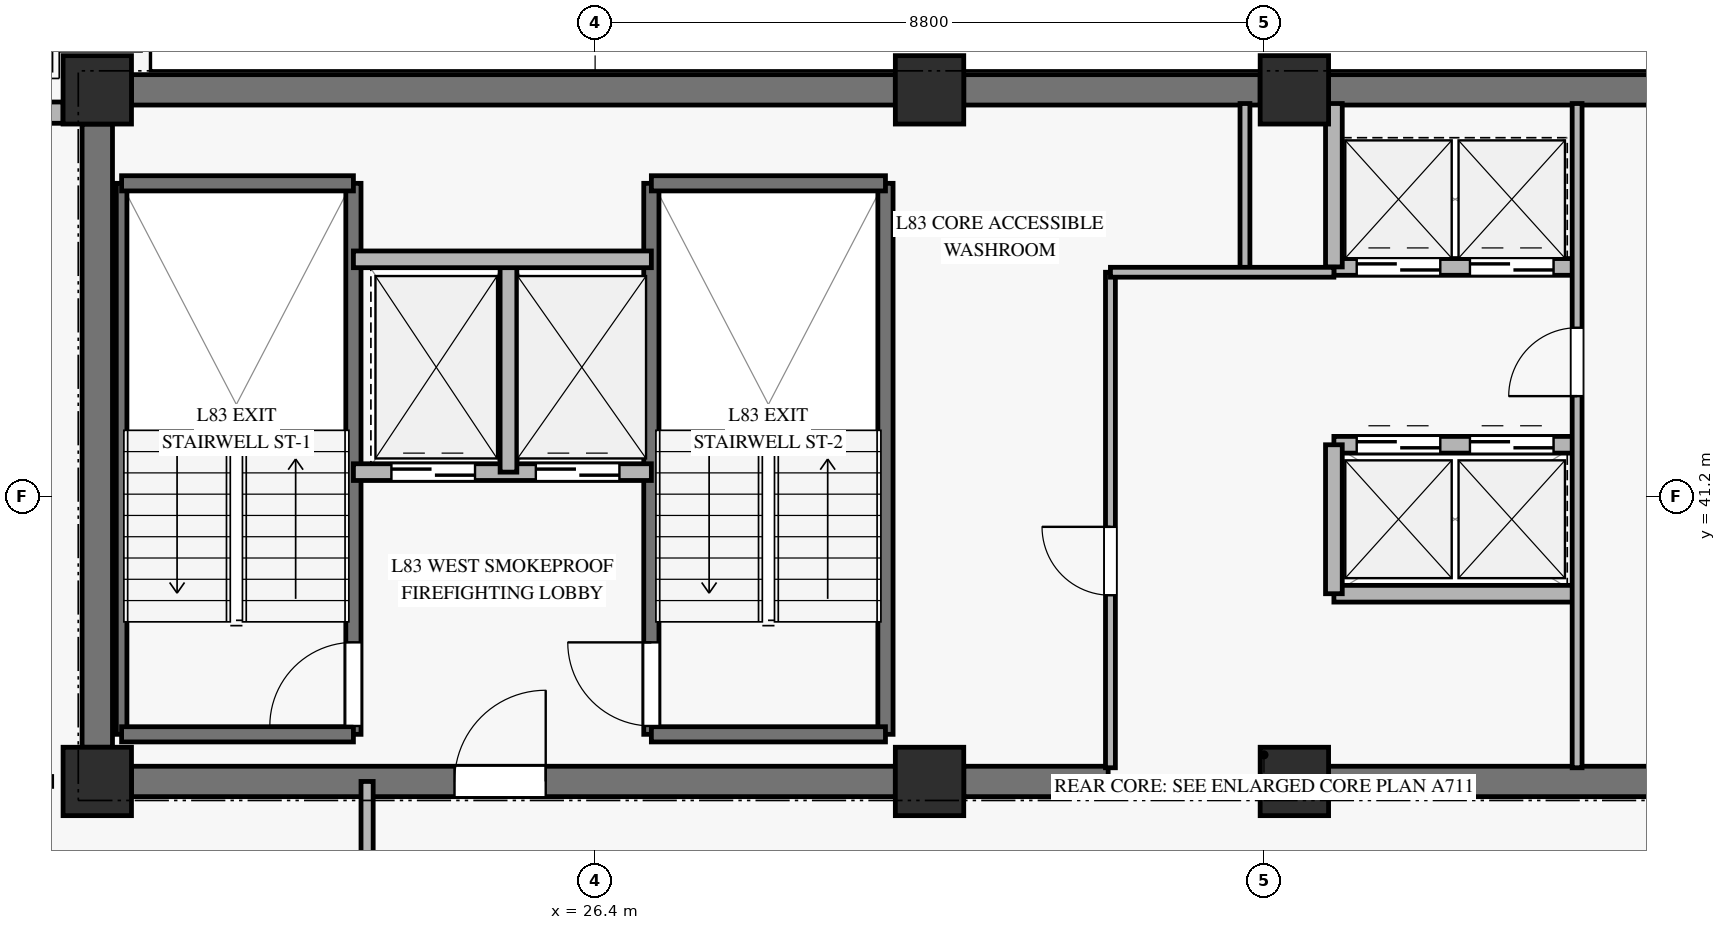
"""IFC4 building model, lengths in metres.
Left out: names, types, materials, properties, quantities, classifications, styles, units other than length and angle.
Written with IfcOpenShell. Run it as: python <this file> out.ifc"""

import sys

from ifc_helpers import new_model, si_unit, direction, frame, frame_2d, origin, origin_2d, place, context, subcontext, project, spatial, rectangle, extrude, source, transform, mapped, element, fill, save


model = new_model("IFC4")
c1 = context("Model", 3, precision=1e-05, world=origin(), true_north=direction((0.0, 1.0)))
c2 = subcontext(c1, "Body", "Model", "MODEL_VIEW")
j1 = project(units=[si_unit("LENGTHUNIT", "METRE"), si_unit("PLANEANGLEUNIT", "RADIAN")], contexts=[c1])
p1 = place(None, origin())
s1 = spatial("IfcSite", under=j1, at=p1, CompositionType="ELEMENT")
p2 = place(p1, origin())
s2 = spatial("IfcBuilding", under=s1, at=p2, CompositionType="ELEMENT")
p3 = place(p2, frame((0.0, 0.0, 321.0)))
s3 = spatial("IfcBuildingStorey", under=s2, at=p3, CompositionType="ELEMENT", Elevation=321.0)
m1 = source(origin(), c2, "Body", "SweptSolid", [
    extrude(rectangle(XDim=0.9, YDim=0.9, at=origin_2d()), origin(), (0.0, 0.0, 1.0), 3.185),
])
for number, where, z_axis, x_axis in (
    (1, (19.85, 37.45, 0.0), (0.0, 0.0, 1.0), (1.0, 0.0, 0.0)),
    (2, (19.85, 46.55, 0.0), (0.0, 0.0, 1.0), (1.0, 0.0, 0.0)),
    (3, (30.8, 37.45, 0.0), (0.0, 0.0, 1.0), (1.0, 0.0, 0.0)),
    (4, (30.8, 46.55, 0.0), (0.0, 0.0, 1.0), (1.0, 0.0, 0.0)),
    (5, (35.6, 37.45, 0.0), (0.0, 0.0, 1.0), (1.0, 0.0, 0.0)),
    (6, (35.6, 46.55, 0.0), (0.0, 0.0, 1.0), (1.0, 0.0, 0.0)),
):
    element("IfcColumn", number, at=place(p3, frame(where, z_axis=z_axis, x_axis=x_axis)), inside=s3, PredefinedType="PILASTER", context=c2, shape_type="MappedRepresentation", body=[
        mapped(m1, transform((0.0, 0.0, 0.0), x_axis=(1.0, 0.0, 0.0), y_axis=(0.0, 1.0, 0.0), z_axis=(0.0, 0.0, 1.0), scale=1.0)),
    ])
p4 = place(p3, frame((20.3, 46.55, 0.0), z_axis=(0.0, 0.0, 1.0), x_axis=(1.0, 0.0, 0.0)))
e7 = element("IfcWall", 7, at=p4, inside=s3, PredefinedType="SHEAR", context=c2, shape_type="SweptSolid", body=[
    extrude(rectangle(XDim=10.05, YDim=0.4, at=frame_2d((5.025, 0.0))), origin(), (0.0, 0.0, 1.0), 3.185),
])
p5 = place(p3, frame((31.25, 46.55, 0.0), z_axis=(0.0, 0.0, 1.0), x_axis=(1.0, 0.0, 0.0)))
e8 = element("IfcWall", 8, at=p5, inside=s3, PredefinedType="SHEAR", context=c2, shape_type="SweptSolid", body=[
    extrude(rectangle(XDim=3.9, YDim=0.4, at=frame_2d((1.95, 0.0))), origin(), (0.0, 0.0, 1.0), 3.185),
])
p6 = place(p3, frame((36.05, 46.55, 0.0), z_axis=(0.0, 0.0, 1.0), x_axis=(1.0, 0.0, 0.0)))
e9 = element("IfcWall", 9, at=p6, inside=s3, PredefinedType="SHEAR", context=c2, shape_type="SweptSolid", body=[
    extrude(rectangle(XDim=7.8, YDim=0.4, at=frame_2d((3.9, 0.0))), origin(), (0.0, 0.0, 1.0), 3.185),
])
p7 = place(p3, frame((20.3, 37.45, 0.0), z_axis=(0.0, 0.0, 1.0), x_axis=(1.0, 0.0, 0.0)))
e10 = element("IfcWall", 10, at=p7, inside=s3, PredefinedType="SHEAR", context=c2, shape_type="SweptSolid", body=[
    extrude(rectangle(XDim=10.05, YDim=0.4, at=frame_2d((5.025, 0.0))), origin(), (0.0, 0.0, 1.0), 3.185),
])
p8 = place(p7, frame((4.25, 0.0, 0.0)))
e11 = element("IfcOpeningElement", 11, at=p8, cuts=e10, PredefinedType="OPENING", context=c2, shape_type="SweptSolid", body=[
    extrude(rectangle(XDim=1.2, YDim=2.15, at=frame_2d((0.6, 1.075))), frame((0.0, 0.21, 0.0), z_axis=(0.0, -1.0, 0.0), x_axis=(1.0, 0.0, 0.0)), (0.0, 0.0, 1.0), 0.42),
])
p9 = place(p3, frame((31.25, 37.45, 0.0), z_axis=(0.0, 0.0, 1.0), x_axis=(1.0, 0.0, 0.0)))
e12 = element("IfcWall", 12, at=p9, inside=s3, PredefinedType="SHEAR", context=c2, shape_type="SweptSolid", body=[
    extrude(rectangle(XDim=1.9, YDim=0.4, at=frame_2d((0.95, 0.0))), origin(), (0.0, 0.0, 1.0), 3.185),
])
p10 = place(p3, frame((36.05, 37.45, 0.0), z_axis=(0.0, 0.0, 1.0), x_axis=(1.0, 0.0, 0.0)))
e13 = element("IfcWall", 13, at=p10, inside=s3, PredefinedType="SHEAR", context=c2, shape_type="SweptSolid", body=[
    extrude(rectangle(XDim=7.8, YDim=0.4, at=frame_2d((3.9, 0.0))), origin(), (0.0, 0.0, 1.0), 3.185),
])
p11 = place(p3, frame((19.85, 37.9, 0.0), z_axis=(0.0, 0.0, 1.0), x_axis=(0.0, 1.0, 0.0)))
e14 = element("IfcWall", 14, at=p11, inside=s3, PredefinedType="SHEAR", context=c2, shape_type="SweptSolid", body=[
    extrude(rectangle(XDim=8.2, YDim=0.4, at=frame_2d((4.1, 0.0))), origin(), (0.0, 0.0, 1.0), 3.185),
])
p12 = place(p3, frame((13.393, 46.25, 0.0), z_axis=(0.0, 0.0, 1.0), x_axis=(1.0, 0.0, 0.0)))
e15 = element("IfcWall", 15, at=p12, inside=s3, PredefinedType="SOLIDWALL", context=c2, shape_type="SweptSolid", body=[
    extrude(rectangle(XDim=6.007, YDim=0.28, at=frame_2d((3.003, 0.0))), origin(), (0.0, 0.0, 1.0), 2.815),
])
p13 = place(p12, frame((2.203, 0.0, 0.45)))
e16 = element("IfcOpeningElement", 16, at=p13, cuts=e15, PredefinedType="OPENING", context=c2, shape_type="SweptSolid", body=[
    extrude(rectangle(XDim=1.6, YDim=2.0, at=frame_2d((0.8, 1.0))), frame((0.0, 0.15, 0.0), z_axis=(0.0, -1.0, 0.0), x_axis=(1.0, 0.0, 0.0)), (0.0, 0.0, 1.0), 0.3),
])
p14 = place(p3, frame((20.17, 38.07, 0.0), z_axis=(0.0, 0.0, 1.0), x_axis=(0.0, 1.0, 0.0)))
e17 = element("IfcWall", 17, at=p14, inside=s3, PredefinedType="SOLIDWALL", context=c2, shape_type="SweptSolid", body=[
    extrude(rectangle(XDim=7.25, YDim=0.14, at=frame_2d((3.625, 0.0))), origin(), (0.0, 0.0, 1.0), 3.4),
])
p15 = place(p3, frame((23.22, 38.07, 0.0), z_axis=(0.0, 0.0, 1.0), x_axis=(0.0, 1.0, 0.0)))
e18 = element("IfcWall", 18, at=p15, inside=s3, PredefinedType="SOLIDWALL", context=c2, shape_type="SweptSolid", body=[
    extrude(rectangle(XDim=7.25, YDim=0.2, at=frame_2d((3.625, 0.0))), origin(), (0.0, 0.0, 1.0), 3.4),
])
p16 = place(p15, frame((0.11, 0.0, 0.0)))
e19 = element("IfcOpeningElement", 19, at=p16, cuts=e18, PredefinedType="OPENING", context=c2, shape_type="SweptSolid", body=[
    extrude(rectangle(XDim=1.1, YDim=2.15, at=frame_2d((0.55, 1.075))), frame((0.0, 0.11, 0.0), z_axis=(0.0, -1.0, 0.0), x_axis=(1.0, 0.0, 0.0)), (0.0, 0.0, 1.0), 0.22),
])
for number, where, z_axis, x_axis in (
    (20, (20.17, 45.32, 0.0), (0.0, 0.0, 1.0), (1.0, 0.0, 0.0)),
    (21, (20.17, 38.07, 0.0), (0.0, 0.0, 1.0), (1.0, 0.0, 0.0)),
):
    element("IfcWall", number, at=place(p3, frame(where, z_axis=z_axis, x_axis=x_axis)), inside=s3, PredefinedType="SOLIDWALL", context=c2, shape_type="SweptSolid", body=[
        extrude(rectangle(XDim=3.05, YDim=0.2, at=frame_2d((1.525, 0.0))), origin(), (0.0, 0.0, 1.0), 3.4),
    ])
p17 = place(p3, frame((27.14, 38.07, 0.0), z_axis=(0.0, 0.0, 1.0), x_axis=(0.0, 1.0, 0.0)))
e22 = element("IfcWall", 22, at=p17, inside=s3, PredefinedType="SOLIDWALL", context=c2, shape_type="SweptSolid", body=[
    extrude(rectangle(XDim=7.25, YDim=0.2, at=frame_2d((3.625, 0.0))), origin(), (0.0, 0.0, 1.0), 3.4),
])
p18 = place(p17, frame((0.11, 0.0, 0.0)))
e23 = element("IfcOpeningElement", 23, at=p18, cuts=e22, PredefinedType="OPENING", context=c2, shape_type="SweptSolid", body=[
    extrude(rectangle(XDim=1.1, YDim=2.15, at=frame_2d((0.55, 1.075))), frame((0.0, 0.11, 0.0), z_axis=(0.0, -1.0, 0.0), x_axis=(1.0, 0.0, 0.0)), (0.0, 0.0, 1.0), 0.22),
])
p19 = place(p3, frame((30.22, 38.07, 0.0), z_axis=(0.0, 0.0, 1.0), x_axis=(0.0, 1.0, 0.0)))
e24 = element("IfcWall", 24, at=p19, inside=s3, PredefinedType="SOLIDWALL", context=c2, shape_type="SweptSolid", body=[
    extrude(rectangle(XDim=7.25, YDim=0.2, at=frame_2d((3.625, 0.0))), origin(), (0.0, 0.0, 1.0), 3.4),
])
for number, where, z_axis, x_axis in (
    (25, (27.14, 45.32, 0.0), (0.0, 0.0, 1.0), (1.0, 0.0, 0.0)),
    (26, (27.14, 38.07, 0.0), (0.0, 0.0, 1.0), (1.0, 0.0, 0.0)),
):
    element("IfcWall", number, at=place(p3, frame(where, z_axis=z_axis, x_axis=x_axis)), inside=s3, PredefinedType="SOLIDWALL", context=c2, shape_type="SweptSolid", body=[
        extrude(rectangle(XDim=3.08, YDim=0.2, at=frame_2d((1.54, 0.0))), origin(), (0.0, 0.0, 1.0), 3.4),
    ])
p20 = place(p3, frame((23.22, 41.52, 0.0), z_axis=(0.0, 0.0, 1.0), x_axis=(1.0, 0.0, 0.0)))
e27 = element("IfcWall", 27, at=p20, inside=s3, PredefinedType="SOLIDWALL", context=c2, shape_type="SweptSolid", body=[
    extrude(rectangle(XDim=3.92, YDim=0.22, at=frame_2d((1.96, 0.0))), origin(), (0.0, 0.0, 1.0), 3.185),
])
p21 = place(p20, frame((0.5, 0.0, 0.0)))
e28 = element("IfcOpeningElement", 28, at=p21, cuts=e27, PredefinedType="OPENING", context=c2, shape_type="SweptSolid", body=[
    extrude(rectangle(XDim=1.1, YDim=2.2, at=frame_2d((0.55, 1.1))), frame((0.0, 0.12, 0.0), z_axis=(0.0, -1.0, 0.0), x_axis=(1.0, 0.0, 0.0)), (0.0, 0.0, 1.0), 0.24),
])
p22 = place(p20, frame((2.4, 0.0, 0.0)))
e29 = element("IfcOpeningElement", 29, at=p22, cuts=e27, PredefinedType="OPENING", context=c2, shape_type="SweptSolid", body=[
    extrude(rectangle(XDim=1.1, YDim=2.2, at=frame_2d((0.55, 1.1))), frame((0.0, 0.12, 0.0), z_axis=(0.0, -1.0, 0.0), x_axis=(1.0, 0.0, 0.0)), (0.0, 0.0, 1.0), 0.24),
])
p23 = place(p3, frame((25.26, 41.52, 0.0), z_axis=(0.0, 0.0, 1.0), x_axis=(0.0, 1.0, 0.0)))
e30 = element("IfcWall", 30, at=p23, inside=s3, PredefinedType="SOLIDWALL", context=c2, shape_type="SweptSolid", body=[
    extrude(rectangle(XDim=2.8, YDim=0.22, at=frame_2d((1.4, 0.0))), origin(), (0.0, 0.0, 1.0), 3.185),
])
p24 = place(p3, frame((23.22, 44.32, 0.0), z_axis=(0.0, 0.0, 1.0), x_axis=(1.0, 0.0, 0.0)))
e31 = element("IfcWall", 31, at=p24, inside=s3, PredefinedType="SOLIDWALL", context=c2, shape_type="SweptSolid", body=[
    extrude(rectangle(XDim=3.92, YDim=0.22, at=frame_2d((1.96, 0.0))), origin(), (0.0, 0.0, 1.0), 3.185),
])
p25 = place(p3, frame((36.12, 44.22, 0.0), z_axis=(0.0, 0.0, 1.0), x_axis=(1.0, 0.0, 0.0)))
e32 = element("IfcWall", 32, at=p25, inside=s3, PredefinedType="SOLIDWALL", context=c2, shape_type="SweptSolid", body=[
    extrude(rectangle(XDim=3.2, YDim=0.22, at=frame_2d((1.6, 0.0))), origin(), (0.0, 0.0, 1.0), 3.185),
])
p26 = place(p25, frame((0.3, 0.0, 0.0)))
e33 = element("IfcOpeningElement", 33, at=p26, cuts=e32, PredefinedType="OPENING", context=c2, shape_type="SweptSolid", body=[
    extrude(rectangle(XDim=1.1, YDim=2.2, at=frame_2d((0.55, 1.1))), frame((0.0, 0.12, 0.0), z_axis=(0.0, -1.0, 0.0), x_axis=(1.0, 0.0, 0.0)), (0.0, 0.0, 1.0), 0.24),
])
p27 = place(p25, frame((1.79, 0.0, 0.0)))
e34 = element("IfcOpeningElement", 34, at=p27, cuts=e32, PredefinedType="OPENING", context=c2, shape_type="SweptSolid", body=[
    extrude(rectangle(XDim=1.1, YDim=2.2, at=frame_2d((0.55, 1.1))), frame((0.0, 0.12, 0.0), z_axis=(0.0, -1.0, 0.0), x_axis=(1.0, 0.0, 0.0)), (0.0, 0.0, 1.0), 0.24),
])
p28 = place(p3, frame((36.12, 41.88, 0.0), z_axis=(0.0, 0.0, 1.0), x_axis=(1.0, 0.0, 0.0)))
e35 = element("IfcWall", 35, at=p28, inside=s3, PredefinedType="SOLIDWALL", context=c2, shape_type="SweptSolid", body=[
    extrude(rectangle(XDim=3.2, YDim=0.22, at=frame_2d((1.6, 0.0))), origin(), (0.0, 0.0, 1.0), 3.185),
])
p29 = place(p28, frame((0.3, 0.0, 0.0)))
e36 = element("IfcOpeningElement", 36, at=p29, cuts=e35, PredefinedType="OPENING", context=c2, shape_type="SweptSolid", body=[
    extrude(rectangle(XDim=1.1, YDim=2.2, at=frame_2d((0.55, 1.1))), frame((0.0, 0.12, 0.0), z_axis=(0.0, -1.0, 0.0), x_axis=(1.0, 0.0, 0.0)), (0.0, 0.0, 1.0), 0.24),
])
p30 = place(p28, frame((1.79, 0.0, 0.0)))
e37 = element("IfcOpeningElement", 37, at=p30, cuts=e35, PredefinedType="OPENING", context=c2, shape_type="SweptSolid", body=[
    extrude(rectangle(XDim=1.1, YDim=2.2, at=frame_2d((0.55, 1.1))), frame((0.0, 0.12, 0.0), z_axis=(0.0, -1.0, 0.0), x_axis=(1.0, 0.0, 0.0)), (0.0, 0.0, 1.0), 0.24),
])
p31 = place(p3, frame((36.12, 39.92, 0.0), z_axis=(0.0, 0.0, 1.0), x_axis=(1.0, 0.0, 0.0)))
e38 = element("IfcWall", 38, at=p31, inside=s3, PredefinedType="SOLIDWALL", context=c2, shape_type="SweptSolid", body=[
    extrude(rectangle(XDim=3.2, YDim=0.22, at=frame_2d((1.6, 0.0))), origin(), (0.0, 0.0, 1.0), 3.185),
])
p32 = place(p3, frame((36.12, 39.92, 0.0), z_axis=(0.0, 0.0, 1.0), x_axis=(0.0, 1.0, 0.0)))
e39 = element("IfcWall", 39, at=p32, inside=s3, PredefinedType="SOLIDWALL", context=c2, shape_type="SweptSolid", body=[
    extrude(rectangle(XDim=1.96, YDim=0.22, at=frame_2d((0.98, 0.0))), origin(), (0.0, 0.0, 1.0), 3.185),
])
p33 = place(p3, frame((36.12, 44.22, 0.0), z_axis=(0.0, 0.0, 1.0), x_axis=(0.0, 1.0, 0.0)))
e40 = element("IfcWall", 40, at=p33, inside=s3, PredefinedType="SOLIDWALL", context=c2, shape_type="SweptSolid", body=[
    extrude(rectangle(XDim=2.15, YDim=0.22, at=frame_2d((1.075, 0.0))), origin(), (0.0, 0.0, 1.0), 3.185),
])
p34 = place(p3, frame((33.18, 37.63, 0.0), z_axis=(0.0, 0.0, 1.0), x_axis=(0.0, 1.0, 0.0)))
e41 = element("IfcWall", 41, at=p34, inside=s3, PredefinedType="PARTITIONING", context=c2, shape_type="SweptSolid", body=[
    extrude(rectangle(XDim=6.52, YDim=0.13, at=frame_2d((3.26, 0.0))), origin(), (0.0, 0.0, 1.0), 2.27),
])
p35 = place(p34, frame((2.27, 0.0, 0.0)))
e42 = element("IfcOpeningElement", 42, at=p35, cuts=e41, PredefinedType="OPENING", context=c2, shape_type="SweptSolid", body=[
    extrude(rectangle(XDim=0.9, YDim=2.1, at=frame_2d((0.45, 1.05))), frame((0.0, 0.075, 0.0), z_axis=(0.0, -1.0, 0.0), x_axis=(1.0, 0.0, 0.0)), (0.0, 0.0, 1.0), 0.15),
])
p36 = place(p3, frame((34.95, 44.15, 0.0), z_axis=(0.0, 0.0, 1.0), x_axis=(0.0, 1.0, 0.0)))
e43 = element("IfcWall", 43, at=p36, inside=s3, PredefinedType="PARTITIONING", context=c2, shape_type="SweptSolid", body=[
    extrude(rectangle(XDim=2.22, YDim=0.13, at=frame_2d((1.11, 0.0))), origin(), (0.0, 0.0, 1.0), 3.185),
])
p37 = place(p3, frame((33.18, 44.15, 0.0), z_axis=(0.0, 0.0, 1.0), x_axis=(1.0, 0.0, 0.0)))
e44 = element("IfcWall", 44, at=p37, inside=s3, PredefinedType="PARTITIONING", context=c2, shape_type="SweptSolid", body=[
    extrude(rectangle(XDim=2.94, YDim=0.13, at=frame_2d((1.47, 0.0))), origin(), (0.0, 0.0, 1.0), 2.47),
])
p38 = place(p3, frame((39.32, 37.63, 0.0), z_axis=(0.0, 0.0, 1.0), x_axis=(0.0, 1.0, 0.0)))
e45 = element("IfcWall", 45, at=p38, inside=s3, PredefinedType="PARTITIONING", context=c2, shape_type="SweptSolid", body=[
    extrude(rectangle(XDim=8.74, YDim=0.13, at=frame_2d((4.37, 0.0))), origin(), (0.0, 0.0, 1.0), 3.185),
])
p39 = place(p38, frame((4.89, 0.0, 0.0)))
e46 = element("IfcOpeningElement", 46, at=p39, cuts=e45, PredefinedType="OPENING", context=c2, shape_type="SweptSolid", body=[
    extrude(rectangle(XDim=0.9, YDim=2.1, at=frame_2d((0.45, 1.05))), frame((0.0, 0.075, 0.0), z_axis=(0.0, -1.0, 0.0), x_axis=(1.0, 0.0, 0.0)), (0.0, 0.0, 1.0), 0.15),
])
p40 = place(p3, frame((23.4, 20.704, 0.0), z_axis=(0.0, 0.0, 1.0), x_axis=(0.0, 1.0, 0.0)))
e47 = element("IfcWall", 47, at=p40, inside=s3, PredefinedType="PARTITIONING", context=c2, shape_type="SweptSolid", body=[
    extrude(rectangle(XDim=16.746, YDim=0.16, at=frame_2d((8.373, 0.0))), origin(), (0.0, 0.0, 1.0), 2.77),
])
p41 = place(p40, frame((13.766, 0.0, 0.0)))
e48 = element("IfcOpeningElement", 48, at=p41, cuts=e47, PredefinedType="OPENING", context=c2, shape_type="SweptSolid", body=[
    extrude(rectangle(XDim=1.05, YDim=2.15, at=frame_2d((0.525, 1.075))), frame((0.0, 0.09, 0.0), z_axis=(0.0, -1.0, 0.0), x_axis=(1.0, 0.0, 0.0)), (0.0, 0.0, 1.0), 0.18),
])
m2 = source(origin(), c2, "Body", "SweptSolid", [
    extrude(rectangle(XDim=1.1, YDim=2.15, at=frame_2d((0.55, 1.075))), frame((0.0, 0.025, 0.0), z_axis=(0.0, -1.0, 0.0), x_axis=(1.0, 0.0, 0.0)), (0.0, 0.0, 1.0), 0.05),
])
p42 = place(p16, origin())
e49 = element("IfcDoor", 49, at=p42, inside=s3, OperationType="SINGLE_SWING_LEFT", PredefinedType="DOOR", context=c2, shape_type="MappedRepresentation", body=[
    mapped(m2, transform((0.0, 0.0, 0.0), x_axis=(1.0, 0.0, 0.0), y_axis=(0.0, 1.0, 0.0), z_axis=(0.0, 0.0, 1.0), scale=1.0)),
])
fill(e19, e49)
p43 = place(p18, origin())
e50 = element("IfcDoor", 50, at=p43, inside=s3, OperationType="SINGLE_SWING_RIGHT", PredefinedType="DOOR", context=c2, shape_type="MappedRepresentation", body=[
    mapped(m2, transform((0.0, 0.0, 0.0), x_axis=(1.0, 0.0, 0.0), y_axis=(0.0, 1.0, 0.0), z_axis=(0.0, 0.0, 1.0), scale=1.0)),
])
fill(e23, e50)
m3 = source(origin(), c2, "Body", "SweptSolid", [
    extrude(rectangle(XDim=1.1, YDim=2.2, at=frame_2d((0.55, 1.1))), frame((0.0, 0.025, 0.0), z_axis=(0.0, -1.0, 0.0), x_axis=(1.0, 0.0, 0.0)), (0.0, 0.0, 1.0), 0.05),
])
p44 = place(p21, origin())
e51 = element("IfcDoor", 51, at=p44, inside=s3, OperationType="SLIDING_TO_LEFT", PredefinedType="DOOR", context=c2, shape_type="MappedRepresentation", body=[
    mapped(m3, transform((0.0, 0.0, 0.0), x_axis=(1.0, 0.0, 0.0), y_axis=(0.0, 1.0, 0.0), z_axis=(0.0, 0.0, 1.0), scale=1.0)),
])
fill(e28, e51)
p45 = place(p22, origin())
e52 = element("IfcDoor", 52, at=p45, inside=s3, OperationType="SLIDING_TO_LEFT", PredefinedType="DOOR", context=c2, shape_type="MappedRepresentation", body=[
    mapped(m3, transform((0.0, 0.0, 0.0), x_axis=(1.0, 0.0, 0.0), y_axis=(0.0, 1.0, 0.0), z_axis=(0.0, 0.0, 1.0), scale=1.0)),
])
fill(e29, e52)
m4 = source(origin(), c2, "Body", "SweptSolid", [
    extrude(rectangle(XDim=1.2, YDim=2.15, at=frame_2d((0.6, 1.075))), frame((0.0, 0.025, 0.0), z_axis=(0.0, -1.0, 0.0), x_axis=(1.0, 0.0, 0.0)), (0.0, 0.0, 1.0), 0.05),
])
p46 = place(p8, origin())
e53 = element("IfcDoor", 53, at=p46, inside=s3, OperationType="SINGLE_SWING_RIGHT", PredefinedType="DOOR", context=c2, shape_type="MappedRepresentation", body=[
    mapped(m4, transform((0.0, 0.0, 0.0), x_axis=(1.0, 0.0, 0.0), y_axis=(0.0, 1.0, 0.0), z_axis=(0.0, 0.0, 1.0), scale=1.0)),
])
fill(e11, e53)
p47 = place(p26, origin())
e54 = element("IfcDoor", 54, at=p47, inside=s3, OperationType="SLIDING_TO_LEFT", PredefinedType="DOOR", context=c2, shape_type="MappedRepresentation", body=[
    mapped(m3, transform((0.0, 0.0, 0.0), x_axis=(1.0, 0.0, 0.0), y_axis=(0.0, 1.0, 0.0), z_axis=(0.0, 0.0, 1.0), scale=1.0)),
])
fill(e33, e54)
p48 = place(p27, origin())
e55 = element("IfcDoor", 55, at=p48, inside=s3, OperationType="SLIDING_TO_LEFT", PredefinedType="DOOR", context=c2, shape_type="MappedRepresentation", body=[
    mapped(m3, transform((0.0, 0.0, 0.0), x_axis=(1.0, 0.0, 0.0), y_axis=(0.0, 1.0, 0.0), z_axis=(0.0, 0.0, 1.0), scale=1.0)),
])
fill(e34, e55)
p49 = place(p29, origin())
e56 = element("IfcDoor", 56, at=p49, inside=s3, OperationType="SLIDING_TO_LEFT", PredefinedType="DOOR", context=c2, shape_type="MappedRepresentation", body=[
    mapped(m3, transform((0.0, 0.0, 0.0), x_axis=(1.0, 0.0, 0.0), y_axis=(0.0, 1.0, 0.0), z_axis=(0.0, 0.0, 1.0), scale=1.0)),
])
fill(e36, e56)
p50 = place(p30, origin())
e57 = element("IfcDoor", 57, at=p50, inside=s3, OperationType="SLIDING_TO_LEFT", PredefinedType="DOOR", context=c2, shape_type="MappedRepresentation", body=[
    mapped(m3, transform((0.0, 0.0, 0.0), x_axis=(1.0, 0.0, 0.0), y_axis=(0.0, 1.0, 0.0), z_axis=(0.0, 0.0, 1.0), scale=1.0)),
])
fill(e37, e57)
m5 = source(origin(), c2, "Body", "SweptSolid", [
    extrude(rectangle(XDim=0.9, YDim=2.1, at=frame_2d((0.45, 1.05))), frame((0.0, 0.025, 0.0), z_axis=(0.0, -1.0, 0.0), x_axis=(1.0, 0.0, 0.0)), (0.0, 0.0, 1.0), 0.05),
])
p51 = place(p35, origin())
e58 = element("IfcDoor", 58, at=p51, inside=s3, OperationType="SINGLE_SWING_RIGHT", PredefinedType="DOOR", context=c2, shape_type="MappedRepresentation", body=[
    mapped(m5, transform((0.0, 0.0, 0.0), x_axis=(1.0, 0.0, 0.0), y_axis=(0.0, 1.0, 0.0), z_axis=(0.0, 0.0, 1.0), scale=1.0)),
])
fill(e42, e58)
p52 = place(p39, origin())
e59 = element("IfcDoor", 59, at=p52, inside=s3, OperationType="SINGLE_SWING_LEFT", PredefinedType="DOOR", context=c2, shape_type="MappedRepresentation", body=[
    mapped(m5, transform((0.0, 0.0, 0.0), x_axis=(1.0, 0.0, 0.0), y_axis=(0.0, 1.0, 0.0), z_axis=(0.0, 0.0, 1.0), scale=1.0)),
])
fill(e46, e59)
save(model, sys.argv[1])
